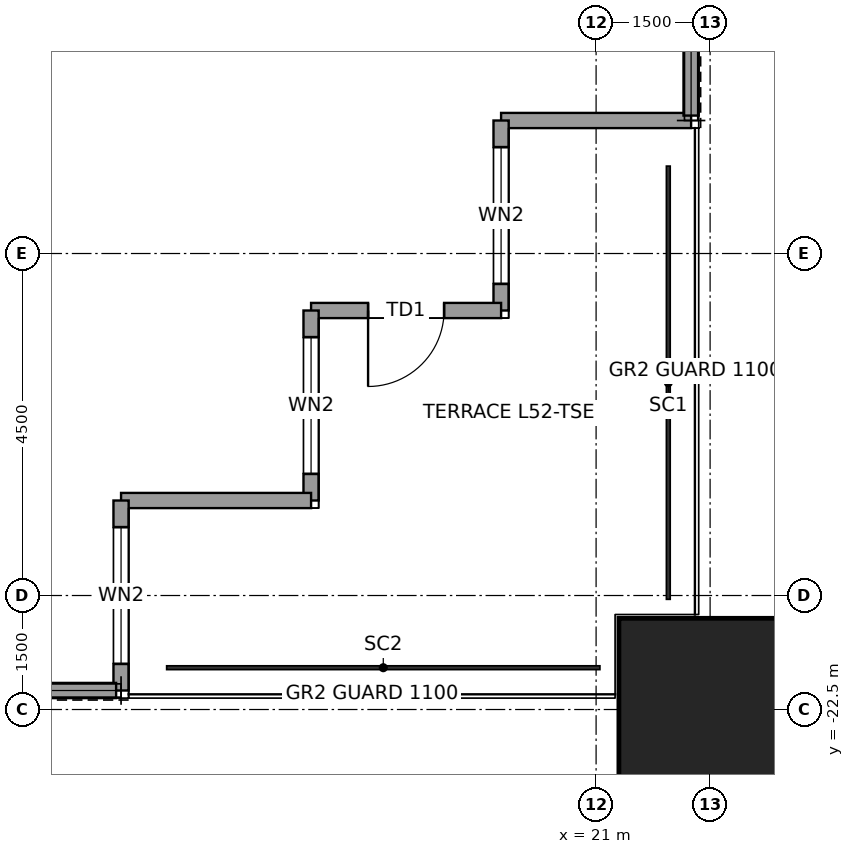
"""IFC4 building model, lengths in metres.
Left out: names, types, materials, properties, quantities, classifications, styles, units other than length and angle.
Written with IfcOpenShell. Run it as: python <this file> out.ifc"""

import sys

from ifc_helpers import new_model, si_unit, direction, frame, frame_2d, origin, origin_2d, place, context, subcontext, project, spatial, rectangle, hollow_rectangle, extrude, element, fill, save


model = new_model("IFC4")
c1 = context("Model", 3, precision=1e-05, world=origin(), true_north=direction((0.0, 1.0)))
c2 = subcontext(c1, "Body", "Model", "MODEL_VIEW")
j1 = project(units=[si_unit("LENGTHUNIT", "METRE"), si_unit("PLANEANGLEUNIT", "RADIAN")], contexts=[c1])
p1 = place(None, origin())
s1 = spatial("IfcSite", under=j1, at=p1, CompositionType="ELEMENT")
p2 = place(p1, origin())
s2 = spatial("IfcBuilding", under=s1, at=p2, CompositionType="ELEMENT")
p3 = place(p2, frame((0.0, 0.0, 241.9)))
s3 = spatial("IfcBuildingStorey", under=s2, at=p3, CompositionType="ELEMENT", Elevation=241.9)
p4 = place(p3, frame((22.5, -22.5, 0.0), z_axis=(0.0, 0.0, 1.0), x_axis=(1.0, 0.0, 0.0)))
e1 = element("IfcColumn", 1, at=p4, inside=s3, PredefinedType="COLUMN", context=c2, shape_type="SweptSolid", body=[
    extrude(hollow_rectangle(XDim=2.4, YDim=2.4, WallThickness=0.12, at=origin_2d()), origin(), (0.0, 0.0, 1.0), 4.0),
])
p5 = place(p3, frame((22.25, -14.75, 0.0), z_axis=(0.0, 0.0, 1.0), x_axis=(-1.0, 0.0, 0.0)))
e2 = element("IfcWall", 2, at=p5, inside=s3, PredefinedType="SOLIDWALL", context=c2, shape_type="SweptSolid", body=[
    extrude(rectangle(XDim=2.5, YDim=0.2, at=frame_2d((1.25, 0.0))), origin(), (0.0, 0.0, 1.0), 3.85),
])
p6 = place(p3, frame((19.75, -14.75, 0.0), z_axis=(0.0, 0.0, 1.0), x_axis=(0.0, -1.0, 0.0)))
e3 = element("IfcWall", 3, at=p6, inside=s3, PredefinedType="SOLIDWALL", context=c2, shape_type="SweptSolid", body=[
    extrude(rectangle(XDim=2.5, YDim=0.2, at=frame_2d((1.25, 0.0))), origin(), (0.0, 0.0, 1.0), 3.85),
])
p7 = place(p6, frame((0.35, 0.0, 0.3)))
e4 = element("IfcOpeningElement", 4, at=p7, cuts=e3, PredefinedType="OPENING", context=c2, shape_type="SweptSolid", body=[
    extrude(rectangle(XDim=1.8, YDim=2.4, at=frame_2d((0.9, 1.2))), frame((0.0, 0.11, 0.0), z_axis=(0.0, -1.0, 0.0), x_axis=(1.0, 0.0, 0.0)), (0.0, 0.0, 1.0), 0.22),
])
p8 = place(p3, frame((19.75, -17.25, 0.0), z_axis=(0.0, 0.0, 1.0), x_axis=(-1.0, 0.0, 0.0)))
e5 = element("IfcWall", 5, at=p8, inside=s3, PredefinedType="SOLIDWALL", context=c2, shape_type="SweptSolid", body=[
    extrude(rectangle(XDim=2.5, YDim=0.2, at=frame_2d((1.25, 0.0))), origin(), (0.0, 0.0, 1.0), 3.85),
])
p9 = place(p8, frame((0.75, 0.0, 0.0)))
e6 = element("IfcOpeningElement", 6, at=p9, cuts=e5, PredefinedType="OPENING", context=c2, shape_type="SweptSolid", body=[
    extrude(rectangle(XDim=1.0, YDim=2.4, at=frame_2d((0.5, 1.2))), frame((0.0, 0.11, 0.0), z_axis=(0.0, -1.0, 0.0), x_axis=(1.0, 0.0, 0.0)), (0.0, 0.0, 1.0), 0.22),
])
p10 = place(p3, frame((17.25, -17.25, 0.0), z_axis=(0.0, 0.0, 1.0), x_axis=(0.0, -1.0, 0.0)))
e7 = element("IfcWall", 7, at=p10, inside=s3, PredefinedType="SOLIDWALL", context=c2, shape_type="SweptSolid", body=[
    extrude(rectangle(XDim=2.5, YDim=0.2, at=frame_2d((1.25, 0.0))), origin(), (0.0, 0.0, 1.0), 3.85),
])
p11 = place(p10, frame((0.35, 0.0, 0.3)))
e8 = element("IfcOpeningElement", 8, at=p11, cuts=e7, PredefinedType="OPENING", context=c2, shape_type="SweptSolid", body=[
    extrude(rectangle(XDim=1.8, YDim=2.4, at=frame_2d((0.9, 1.2))), frame((0.0, 0.11, 0.0), z_axis=(0.0, -1.0, 0.0), x_axis=(1.0, 0.0, 0.0)), (0.0, 0.0, 1.0), 0.22),
])
p12 = place(p3, frame((17.25, -19.75, 0.0), z_axis=(0.0, 0.0, 1.0), x_axis=(-1.0, 0.0, 0.0)))
e9 = element("IfcWall", 9, at=p12, inside=s3, PredefinedType="SOLIDWALL", context=c2, shape_type="SweptSolid", body=[
    extrude(rectangle(XDim=2.5, YDim=0.2, at=frame_2d((1.25, 0.0))), origin(), (0.0, 0.0, 1.0), 3.85),
])
p13 = place(p3, frame((14.75, -19.75, 0.0), z_axis=(0.0, 0.0, 1.0), x_axis=(0.0, -1.0, 0.0)))
e10 = element("IfcWall", 10, at=p13, inside=s3, PredefinedType="SOLIDWALL", context=c2, shape_type="SweptSolid", body=[
    extrude(rectangle(XDim=2.5, YDim=0.2, at=frame_2d((1.25, 0.0))), origin(), (0.0, 0.0, 1.0), 3.85),
])
p14 = place(p13, frame((0.35, 0.0, 0.3)))
e11 = element("IfcOpeningElement", 11, at=p14, cuts=e10, PredefinedType="OPENING", context=c2, shape_type="SweptSolid", body=[
    extrude(rectangle(XDim=1.8, YDim=2.4, at=frame_2d((0.9, 1.2))), frame((0.0, 0.11, 0.0), z_axis=(0.0, -1.0, 0.0), x_axis=(1.0, 0.0, 0.0)), (0.0, 0.0, 1.0), 0.22),
])
for number, where, z_axis, x_axis in (
    (12, (22.25, -12.366, 0.0), (0.0, 0.0, 1.0), (0.0, -1.0, 0.0)),
    (13, (14.685, -22.25, 0.0), (0.0, 0.0, 1.0), (-1.0, 0.0, 0.0)),
):
    element("IfcWall", number, at=place(p3, frame(where, z_axis=z_axis, x_axis=x_axis)), inside=s3, PredefinedType="SOLIDWALL", context=c2, shape_type="SweptSolid", body=[
        extrude(rectangle(XDim=2.319, YDim=0.2, at=frame_2d((1.16, 0.0))), origin(), (0.0, 0.0, 1.0), 3.85),
    ])
p15 = place(p7, origin())
e14 = element("IfcWindow", 14, at=p15, inside=s3, PartitioningType="SINGLE_PANEL", PredefinedType="WINDOW", context=c2, shape_type="SweptSolid", body=[
    extrude(rectangle(XDim=1.8, YDim=2.4, at=frame_2d((0.9, 1.2))), frame((0.0, 0.03, 0.0), z_axis=(0.0, -1.0, 0.0), x_axis=(1.0, 0.0, 0.0)), (0.0, 0.0, 1.0), 0.06),
])
fill(e4, e14)
p16 = place(p9, origin())
e15 = element("IfcDoor", 15, at=p16, inside=s3, OperationType="SINGLE_SWING_RIGHT", PredefinedType="DOOR", context=c2, shape_type="SweptSolid", body=[
    extrude(rectangle(XDim=1.0, YDim=2.4, at=frame_2d((0.5, 1.2))), frame((0.0, 0.025, 0.0), z_axis=(0.0, -1.0, 0.0), x_axis=(1.0, 0.0, 0.0)), (0.0, 0.0, 1.0), 0.05),
])
fill(e6, e15)
p17 = place(p11, origin())
e16 = element("IfcWindow", 16, at=p17, inside=s3, PartitioningType="SINGLE_PANEL", PredefinedType="WINDOW", context=c2, shape_type="SweptSolid", body=[
    extrude(rectangle(XDim=1.8, YDim=2.4, at=frame_2d((0.9, 1.2))), frame((0.0, 0.03, 0.0), z_axis=(0.0, -1.0, 0.0), x_axis=(1.0, 0.0, 0.0)), (0.0, 0.0, 1.0), 0.06),
])
fill(e8, e16)
p18 = place(p14, origin())
e17 = element("IfcWindow", 17, at=p18, inside=s3, PartitioningType="SINGLE_PANEL", PredefinedType="WINDOW", context=c2, shape_type="SweptSolid", body=[
    extrude(rectangle(XDim=1.8, YDim=2.4, at=frame_2d((0.9, 1.2))), frame((0.0, 0.03, 0.0), z_axis=(0.0, -1.0, 0.0), x_axis=(1.0, 0.0, 0.0)), (0.0, 0.0, 1.0), 0.06),
])
fill(e11, e17)
save(model, sys.argv[1])
